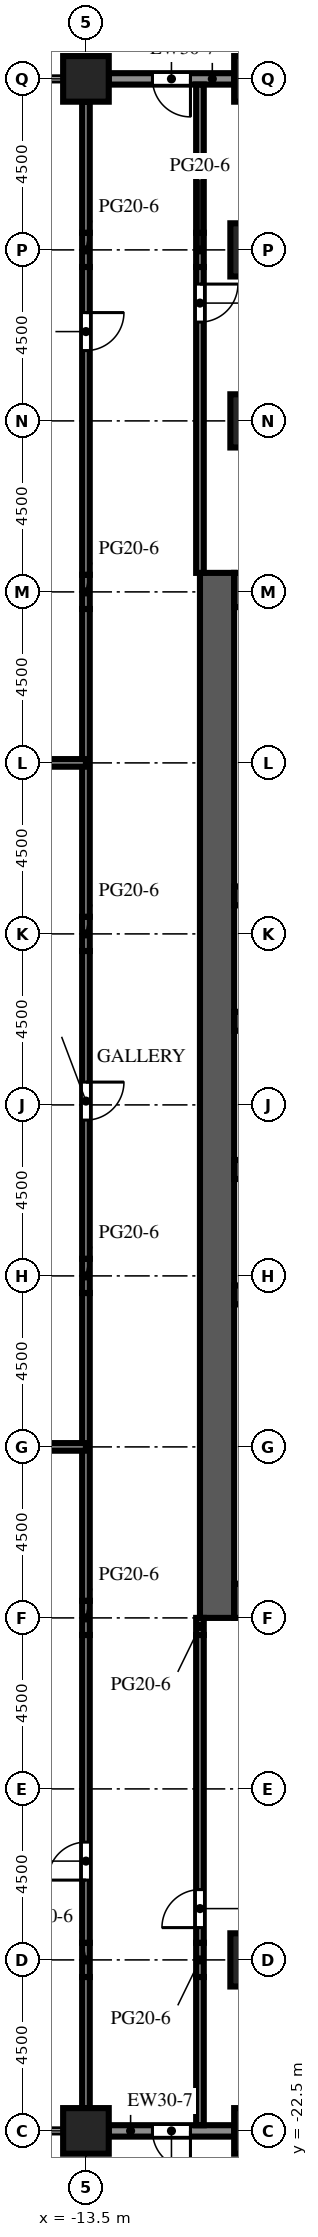
"""IFC4 building model, lengths in metres.
Left out: names, types, materials, properties, quantities, classifications, styles, units other than length and angle.
Written with IfcOpenShell. Run it as: python <this file> out.ifc"""

import sys

from ifc_helpers import new_model, si_unit, direction, frame, frame_2d, origin, origin_2d, place, context, subcontext, project, spatial, rectangle, extrude, element, fill, save


model = new_model("IFC4")
c1 = context("Model", 3, precision=1e-05, world=origin(), true_north=direction((0.0, 1.0)))
c2 = subcontext(c1, "Body", "Model", "MODEL_VIEW")
j1 = project(units=[si_unit("LENGTHUNIT", "METRE"), si_unit("PLANEANGLEUNIT", "RADIAN")], contexts=[c1])
p1 = place(None, origin())
s1 = spatial("IfcSite", under=j1, at=p1, CompositionType="ELEMENT")
p2 = place(p1, origin())
s2 = spatial("IfcBuilding", under=s1, at=p2, CompositionType="ELEMENT")
p3 = place(p2, frame((0.0, 0.0, 110.7)))
s3 = spatial("IfcBuildingStorey", under=s2, at=p3, CompositionType="ELEMENT", Elevation=110.7)
for number, where, z_axis, x_axis in (
    (1, (-13.5, -22.5, 0.0), (0.0, 0.0, 1.0), (1.0, 0.0, 0.0)),
    (2, (-13.5, 31.5, 0.0), (0.0, 0.0, 1.0), (1.0, 0.0, 0.0)),
    (3, (-9.0, -22.5, 0.0), (0.0, 0.0, 1.0), (1.0, 0.0, 0.0)),
    (4, (-9.0, 31.5, 0.0), (0.0, 0.0, 1.0), (1.0, 0.0, 0.0)),
):
    element("IfcColumn", number, at=place(p3, frame(where, z_axis=z_axis, x_axis=x_axis)), inside=s3, PredefinedType="COLUMN", context=c2, shape_type="SweptSolid", body=[
        extrude(rectangle(XDim=1.2, YDim=1.2, at=origin_2d()), origin(), (0.0, 0.0, 1.0), 6.0),
    ])
p4 = place(p3, frame((-9.0, -18.0, 0.0), z_axis=(0.0, 0.0, 1.0), x_axis=(1.0, 0.0, 0.0)))
e5 = element("IfcColumn", 5, at=p4, inside=s3, PredefinedType="COLUMN", context=c2, shape_type="SweptSolid", body=[
    extrude(rectangle(XDim=1.4, YDim=1.4, at=origin_2d()), origin(), (0.0, 0.0, 1.0), 5.55),
])
p5 = place(p3, frame((-9.0, 22.5, 0.0), z_axis=(0.0, 0.0, 1.0), x_axis=(1.0, 0.0, 0.0)))
e6 = element("IfcColumn", 6, at=p5, inside=s3, PredefinedType="COLUMN", context=c2, shape_type="SweptSolid", body=[
    extrude(rectangle(XDim=1.4, YDim=1.4, at=origin_2d()), origin(), (0.0, 0.0, 1.0), 6.0),
])
p6 = place(p3, frame((-9.0, 27.0, 0.0), z_axis=(0.0, 0.0, 1.0), x_axis=(1.0, 0.0, 0.0)))
e7 = element("IfcColumn", 7, at=p6, inside=s3, PredefinedType="COLUMN", context=c2, shape_type="SweptSolid", body=[
    extrude(rectangle(XDim=1.4, YDim=1.4, at=origin_2d()), origin(), (0.0, 0.0, 1.0), 5.55),
])
p7 = place(p3, frame((-10.05, -9.0, 0.0), z_axis=(0.0, 0.0, 1.0), x_axis=(0.0, 1.0, 0.0)))
e8 = element("IfcWall", 8, at=p7, inside=s3, PredefinedType="SHEAR", context=c2, shape_type="SweptSolid", body=[
    extrude(rectangle(XDim=27.5, YDim=0.9, at=frame_2d((13.75, 0.0))), origin(), (0.0, 0.0, 1.0), 6.0),
])
p8 = place(p7, frame((12.55, 0.0, 0.0)))
e9 = element("IfcOpeningElement", 9, at=p8, cuts=e8, PredefinedType="OPENING", context=c2, shape_type="SweptSolid", body=[
    extrude(rectangle(XDim=2.4, YDim=2.4, at=frame_2d((1.2, 1.2))), frame((0.0, 0.46, 0.0), z_axis=(0.0, -1.0, 0.0), x_axis=(1.0, 0.0, 0.0)), (0.0, 0.0, 1.0), 0.92),
])
p9 = place(p7, frame((6.825, 0.0, 0.0)))
e10 = element("IfcOpeningElement", 10, at=p9, cuts=e8, PredefinedType="OPENING", context=c2, shape_type="SweptSolid", body=[
    extrude(rectangle(XDim=1.2, YDim=2.1, at=frame_2d((0.6, 1.05))), frame((0.0, 0.46, 0.0), z_axis=(0.0, -1.0, 0.0), x_axis=(1.0, 0.0, 0.0)), (0.0, 0.0, 1.0), 0.92),
])
p10 = place(p7, frame((19.475, 0.0, 0.0)))
e11 = element("IfcOpeningElement", 11, at=p10, cuts=e8, PredefinedType="OPENING", context=c2, shape_type="SweptSolid", body=[
    extrude(rectangle(XDim=1.2, YDim=2.1, at=frame_2d((0.6, 1.05))), frame((0.0, 0.46, 0.0), z_axis=(0.0, -1.0, 0.0), x_axis=(1.0, 0.0, 0.0)), (0.0, 0.0, 1.0), 0.92),
])
for number, where, z_axis, x_axis in (
    (12, (-9.6, -8.55, 0.0), (0.0, 0.0, 1.0), (1.0, 0.0, 0.0)),
    (13, (-9.6, 18.05, 0.0), (0.0, 0.0, 1.0), (1.0, 0.0, 0.0)),
):
    element("IfcWall", number, at=place(p3, frame(where, z_axis=z_axis, x_axis=x_axis)), inside=s3, PredefinedType="SHEAR", context=c2, shape_type="SweptSolid", body=[
        extrude(rectangle(XDim=10.2, YDim=0.9, at=frame_2d((5.1, 0.0))), origin(), (0.0, 0.0, 1.0), 6.0),
    ])
p11 = place(p3, frame((-9.6, -0.5, 0.0), z_axis=(0.0, 0.0, 1.0), x_axis=(1.0, 0.0, 0.0)))
e14 = element("IfcWall", 14, at=p11, inside=s3, PredefinedType="SHEAR", context=c2, shape_type="SweptSolid", body=[
    extrude(rectangle(XDim=10.2, YDim=0.5, at=frame_2d((5.1, 0.0))), origin(), (0.0, 0.0, 1.0), 6.0),
])
p12 = place(p3, frame((-9.6, 2.8, 0.0), z_axis=(0.0, 0.0, 1.0), x_axis=(1.0, 0.0, 0.0)))
e15 = element("IfcWall", 15, at=p12, inside=s3, PredefinedType="SHEAR", context=c2, shape_type="SweptSolid", body=[
    extrude(rectangle(XDim=10.2, YDim=0.5, at=frame_2d((5.1, 0.0))), origin(), (0.0, 0.0, 1.0), 6.0),
])
p13 = place(p12, frame((0.562, 0.0, 0.0)))
e16 = element("IfcOpeningElement", 16, at=p13, cuts=e15, PredefinedType="OPENING", context=c2, shape_type="SweptSolid", body=[
    extrude(rectangle(XDim=1.1, YDim=2.1, at=frame_2d((0.55, 1.05))), frame((0.0, 0.26, 0.0), z_axis=(0.0, -1.0, 0.0), x_axis=(1.0, 0.0, 0.0)), (0.0, 0.0, 1.0), 0.52),
])
p14 = place(p12, frame((3.238, 0.0, 0.0)))
e17 = element("IfcOpeningElement", 17, at=p14, cuts=e15, PredefinedType="OPENING", context=c2, shape_type="SweptSolid", body=[
    extrude(rectangle(XDim=1.1, YDim=2.1, at=frame_2d((0.55, 1.05))), frame((0.0, 0.26, 0.0), z_axis=(0.0, -1.0, 0.0), x_axis=(1.0, 0.0, 0.0)), (0.0, 0.0, 1.0), 0.52),
])
p15 = place(p12, frame((8.538, 0.0, 0.0)))
e18 = element("IfcOpeningElement", 18, at=p15, cuts=e15, PredefinedType="OPENING", context=c2, shape_type="SweptSolid", body=[
    extrude(rectangle(XDim=1.1, YDim=2.1, at=frame_2d((0.55, 1.05))), frame((0.0, 0.26, 0.0), z_axis=(0.0, -1.0, 0.0), x_axis=(1.0, 0.0, 0.0)), (0.0, 0.0, 1.0), 0.52),
])
p16 = place(p3, frame((-9.6, 6.7, 0.0), z_axis=(0.0, 0.0, 1.0), x_axis=(1.0, 0.0, 0.0)))
e19 = element("IfcWall", 19, at=p16, inside=s3, PredefinedType="SHEAR", context=c2, shape_type="SweptSolid", body=[
    extrude(rectangle(XDim=10.2, YDim=0.5, at=frame_2d((5.1, 0.0))), origin(), (0.0, 0.0, 1.0), 6.0),
])
p17 = place(p16, frame((0.562, 0.0, 0.0)))
e20 = element("IfcOpeningElement", 20, at=p17, cuts=e19, PredefinedType="OPENING", context=c2, shape_type="SweptSolid", body=[
    extrude(rectangle(XDim=1.1, YDim=2.1, at=frame_2d((0.55, 1.05))), frame((0.0, 0.26, 0.0), z_axis=(0.0, -1.0, 0.0), x_axis=(1.0, 0.0, 0.0)), (0.0, 0.0, 1.0), 0.52),
])
p18 = place(p16, frame((3.288, 0.0, 0.0)))
e21 = element("IfcOpeningElement", 21, at=p18, cuts=e19, PredefinedType="OPENING", context=c2, shape_type="SweptSolid", body=[
    extrude(rectangle(XDim=1.0, YDim=2.1, at=frame_2d((0.5, 1.05))), frame((0.0, 0.26, 0.0), z_axis=(0.0, -1.0, 0.0), x_axis=(1.0, 0.0, 0.0)), (0.0, 0.0, 1.0), 0.52),
])
p19 = place(p16, frame((5.913, 0.0, 0.0)))
e22 = element("IfcOpeningElement", 22, at=p19, cuts=e19, PredefinedType="OPENING", context=c2, shape_type="SweptSolid", body=[
    extrude(rectangle(XDim=1.0, YDim=2.1, at=frame_2d((0.5, 1.05))), frame((0.0, 0.26, 0.0), z_axis=(0.0, -1.0, 0.0), x_axis=(1.0, 0.0, 0.0)), (0.0, 0.0, 1.0), 0.52),
])
p20 = place(p16, frame((8.587, 0.0, 0.0)))
e23 = element("IfcOpeningElement", 23, at=p20, cuts=e19, PredefinedType="OPENING", context=c2, shape_type="SweptSolid", body=[
    extrude(rectangle(XDim=1.0, YDim=2.1, at=frame_2d((0.5, 1.05))), frame((0.0, 0.26, 0.0), z_axis=(0.0, -1.0, 0.0), x_axis=(1.0, 0.0, 0.0)), (0.0, 0.0, 1.0), 0.52),
])
p21 = place(p3, frame((-9.6, 10.0, 0.0), z_axis=(0.0, 0.0, 1.0), x_axis=(1.0, 0.0, 0.0)))
e24 = element("IfcWall", 24, at=p21, inside=s3, PredefinedType="SHEAR", context=c2, shape_type="SweptSolid", body=[
    extrude(rectangle(XDim=10.2, YDim=0.5, at=frame_2d((5.1, 0.0))), origin(), (0.0, 0.0, 1.0), 6.0),
])
p22 = place(p3, frame((-9.6, -22.5, 0.0), z_axis=(0.0, 0.0, 1.0), x_axis=(-1.0, 0.0, 0.0)))
e25 = element("IfcWall", 25, at=p22, inside=s3, PredefinedType="SOLIDWALL", context=c2, shape_type="SweptSolid", body=[
    extrude(rectangle(XDim=3.3, YDim=0.3, at=frame_2d((1.65, 0.0))), origin(), (0.0, 0.0, 1.0), 4.65),
])
p23 = place(p22, frame((1.15, 0.0, 0.0)))
e26 = element("IfcOpeningElement", 26, at=p23, cuts=e25, PredefinedType="OPENING", context=c2, shape_type="SweptSolid", body=[
    extrude(rectangle(XDim=1.0, YDim=2.2, at=frame_2d((0.5, 1.1))), frame((0.0, 0.16, 0.0), z_axis=(0.0, -1.0, 0.0), x_axis=(1.0, 0.0, 0.0)), (0.0, 0.0, 1.0), 0.32),
])
p24 = place(p3, frame((-12.9, 31.5, 0.0), z_axis=(0.0, 0.0, 1.0), x_axis=(1.0, 0.0, 0.0)))
e27 = element("IfcWall", 27, at=p24, inside=s3, PredefinedType="SOLIDWALL", context=c2, shape_type="SweptSolid", body=[
    extrude(rectangle(XDim=3.3, YDim=0.3, at=frame_2d((1.65, 0.0))), origin(), (0.0, 0.0, 1.0), 4.65),
])
p25 = place(p24, frame((1.15, 0.0, 0.0)))
e28 = element("IfcOpeningElement", 28, at=p25, cuts=e27, PredefinedType="OPENING", context=c2, shape_type="SweptSolid", body=[
    extrude(rectangle(XDim=1.0, YDim=2.2, at=frame_2d((0.5, 1.1))), frame((0.0, 0.16, 0.0), z_axis=(0.0, -1.0, 0.0), x_axis=(1.0, 0.0, 0.0)), (0.0, 0.0, 1.0), 0.32),
])
p26 = place(p3, frame((-13.5, -21.9, 0.0), z_axis=(0.0, 0.0, 1.0), x_axis=(0.0, 1.0, 0.0)))
e29 = element("IfcWall", 29, at=p26, inside=s3, PredefinedType="PARTITIONING", context=c2, shape_type="SweptSolid", body=[
    extrude(rectangle(XDim=3.45, YDim=0.2, at=frame_2d((1.725, 0.0))), origin(), (0.0, 0.0, 1.0), 5.55),
])
p27 = place(p3, frame((-13.5, -18.45, 0.0), z_axis=(0.0, 0.0, 1.0), x_axis=(0.0, 1.0, 0.0)))
e30 = element("IfcWall", 30, at=p27, inside=s3, PredefinedType="PARTITIONING", context=c2, shape_type="SweptSolid", body=[
    extrude(rectangle(XDim=0.9, YDim=0.2, at=frame_2d((0.45, 0.0))), origin(), (0.0, 0.0, 1.0), 3.72),
])
p28 = place(p3, frame((-13.5, -17.55, 0.0), z_axis=(0.0, 0.0, 1.0), x_axis=(0.0, 1.0, 0.0)))
e31 = element("IfcWall", 31, at=p28, inside=s3, PredefinedType="PARTITIONING", context=c2, shape_type="SweptSolid", body=[
    extrude(rectangle(XDim=8.1, YDim=0.2, at=frame_2d((4.05, 0.0))), origin(), (0.0, 0.0, 1.0), 5.55),
])
p29 = place(p28, frame((1.65, 0.0, 0.0)))
e32 = element("IfcOpeningElement", 32, at=p29, cuts=e31, PredefinedType="OPENING", context=c2, shape_type="SweptSolid", body=[
    extrude(rectangle(XDim=1.0, YDim=2.1, at=frame_2d((0.5, 1.05))), frame((0.0, 0.11, 0.0), z_axis=(0.0, -1.0, 0.0), x_axis=(1.0, 0.0, 0.0)), (0.0, 0.0, 1.0), 0.22),
])
p30 = place(p3, frame((-13.5, -9.45, 0.0), z_axis=(0.0, 0.0, 1.0), x_axis=(0.0, 1.0, 0.0)))
e33 = element("IfcWall", 33, at=p30, inside=s3, PredefinedType="PARTITIONING", context=c2, shape_type="SweptSolid", body=[
    extrude(rectangle(XDim=0.9, YDim=0.2, at=frame_2d((0.45, 0.0))), origin(), (0.0, 0.0, 1.0), 3.72),
])
p31 = place(p3, frame((-13.5, -8.55, 0.0), z_axis=(0.0, 0.0, 1.0), x_axis=(0.0, 1.0, 0.0)))
e34 = element("IfcWall", 34, at=p31, inside=s3, PredefinedType="PARTITIONING", context=c2, shape_type="SweptSolid", body=[
    extrude(rectangle(XDim=8.1, YDim=0.2, at=frame_2d((4.05, 0.0))), origin(), (0.0, 0.0, 1.0), 5.55),
])
p32 = place(p3, frame((-13.5, -0.45, 0.0), z_axis=(0.0, 0.0, 1.0), x_axis=(0.0, 1.0, 0.0)))
e35 = element("IfcWall", 35, at=p32, inside=s3, PredefinedType="PARTITIONING", context=c2, shape_type="SweptSolid", body=[
    extrude(rectangle(XDim=0.9, YDim=0.2, at=frame_2d((0.45, 0.0))), origin(), (0.0, 0.0, 1.0), 3.72),
])
p33 = place(p3, frame((-13.5, 0.45, 0.0), z_axis=(0.0, 0.0, 1.0), x_axis=(0.0, 1.0, 0.0)))
e36 = element("IfcWall", 36, at=p33, inside=s3, PredefinedType="PARTITIONING", context=c2, shape_type="SweptSolid", body=[
    extrude(rectangle(XDim=8.1, YDim=0.2, at=frame_2d((4.05, 0.0))), origin(), (0.0, 0.0, 1.0), 5.55),
])
p34 = place(p33, frame((3.65, 0.0, 0.0)))
e37 = element("IfcOpeningElement", 37, at=p34, cuts=e36, PredefinedType="OPENING", context=c2, shape_type="SweptSolid", body=[
    extrude(rectangle(XDim=1.0, YDim=2.1, at=frame_2d((0.5, 1.05))), frame((0.0, 0.11, 0.0), z_axis=(0.0, -1.0, 0.0), x_axis=(1.0, 0.0, 0.0)), (0.0, 0.0, 1.0), 0.22),
])
p35 = place(p3, frame((-13.5, 8.55, 0.0), z_axis=(0.0, 0.0, 1.0), x_axis=(0.0, 1.0, 0.0)))
e38 = element("IfcWall", 38, at=p35, inside=s3, PredefinedType="PARTITIONING", context=c2, shape_type="SweptSolid", body=[
    extrude(rectangle(XDim=0.9, YDim=0.2, at=frame_2d((0.45, 0.0))), origin(), (0.0, 0.0, 1.0), 3.72),
])
p36 = place(p3, frame((-13.5, 9.45, 0.0), z_axis=(0.0, 0.0, 1.0), x_axis=(0.0, 1.0, 0.0)))
e39 = element("IfcWall", 39, at=p36, inside=s3, PredefinedType="PARTITIONING", context=c2, shape_type="SweptSolid", body=[
    extrude(rectangle(XDim=8.1, YDim=0.2, at=frame_2d((4.05, 0.0))), origin(), (0.0, 0.0, 1.0), 5.55),
])
p37 = place(p3, frame((-13.5, 17.55, 0.0), z_axis=(0.0, 0.0, 1.0), x_axis=(0.0, 1.0, 0.0)))
e40 = element("IfcWall", 40, at=p37, inside=s3, PredefinedType="PARTITIONING", context=c2, shape_type="SweptSolid", body=[
    extrude(rectangle(XDim=0.9, YDim=0.2, at=frame_2d((0.45, 0.0))), origin(), (0.0, 0.0, 1.0), 3.72),
])
p38 = place(p3, frame((-13.5, 18.45, 0.0), z_axis=(0.0, 0.0, 1.0), x_axis=(0.0, 1.0, 0.0)))
e41 = element("IfcWall", 41, at=p38, inside=s3, PredefinedType="PARTITIONING", context=c2, shape_type="SweptSolid", body=[
    extrude(rectangle(XDim=8.1, YDim=0.2, at=frame_2d((4.05, 0.0))), origin(), (0.0, 0.0, 1.0), 5.55),
])
p39 = place(p38, frame((5.9, 0.0, 0.0)))
e42 = element("IfcOpeningElement", 42, at=p39, cuts=e41, PredefinedType="OPENING", context=c2, shape_type="SweptSolid", body=[
    extrude(rectangle(XDim=1.0, YDim=2.1, at=frame_2d((0.5, 1.05))), frame((0.0, 0.11, 0.0), z_axis=(0.0, -1.0, 0.0), x_axis=(1.0, 0.0, 0.0)), (0.0, 0.0, 1.0), 0.22),
])
p40 = place(p3, frame((-13.5, 26.55, 0.0), z_axis=(0.0, 0.0, 1.0), x_axis=(0.0, 1.0, 0.0)))
e43 = element("IfcWall", 43, at=p40, inside=s3, PredefinedType="PARTITIONING", context=c2, shape_type="SweptSolid", body=[
    extrude(rectangle(XDim=0.9, YDim=0.2, at=frame_2d((0.45, 0.0))), origin(), (0.0, 0.0, 1.0), 3.72),
])
p41 = place(p3, frame((-13.5, 27.45, 0.0), z_axis=(0.0, 0.0, 1.0), x_axis=(0.0, 1.0, 0.0)))
e44 = element("IfcWall", 44, at=p41, inside=s3, PredefinedType="PARTITIONING", context=c2, shape_type="SweptSolid", body=[
    extrude(rectangle(XDim=3.45, YDim=0.2, at=frame_2d((1.725, 0.0))), origin(), (0.0, 0.0, 1.0), 5.55),
])
p42 = place(p3, frame((-10.5, -22.35, 0.0), z_axis=(0.0, 0.0, 1.0), x_axis=(0.0, 1.0, 0.0)))
e45 = element("IfcWall", 45, at=p42, inside=s3, PredefinedType="PARTITIONING", context=c2, shape_type="SweptSolid", body=[
    extrude(rectangle(XDim=3.9, YDim=0.2, at=frame_2d((1.95, 0.0))), origin(), (0.0, 0.0, 1.0), 5.55),
])
p43 = place(p3, frame((-10.5, -18.45, 0.0), z_axis=(0.0, 0.0, 1.0), x_axis=(0.0, 1.0, 0.0)))
e46 = element("IfcWall", 46, at=p43, inside=s3, PredefinedType="PARTITIONING", context=c2, shape_type="SweptSolid", body=[
    extrude(rectangle(XDim=0.9, YDim=0.2, at=frame_2d((0.45, 0.0))), origin(), (0.0, 0.0, 1.0), 3.72),
])
p44 = place(p3, frame((-10.5, -9.45, 0.0), z_axis=(0.0, 0.0, 1.0), x_axis=(0.0, -1.0, 0.0)))
e47 = element("IfcWall", 47, at=p44, inside=s3, PredefinedType="PARTITIONING", context=c2, shape_type="SweptSolid", body=[
    extrude(rectangle(XDim=8.1, YDim=0.2, at=frame_2d((4.05, 0.0))), origin(), (0.0, 0.0, 1.0), 5.55),
])
p45 = place(p44, frame((6.7, 0.0, 0.0)))
e48 = element("IfcOpeningElement", 48, at=p45, cuts=e47, PredefinedType="OPENING", context=c2, shape_type="SweptSolid", body=[
    extrude(rectangle(XDim=1.0, YDim=2.1, at=frame_2d((0.5, 1.05))), frame((0.0, 0.11, 0.0), z_axis=(0.0, -1.0, 0.0), x_axis=(1.0, 0.0, 0.0)), (0.0, 0.0, 1.0), 0.22),
])
p46 = place(p3, frame((-10.5, -9.45, 0.0), z_axis=(0.0, 0.0, 1.0), x_axis=(0.0, 1.0, 0.0)))
e49 = element("IfcWall", 49, at=p46, inside=s3, PredefinedType="PARTITIONING", context=c2, shape_type="SweptSolid", body=[
    extrude(rectangle(XDim=0.45, YDim=0.2, at=frame_2d((0.225, 0.0))), origin(), (0.0, 0.0, 1.0), 3.72),
])
p47 = place(p3, frame((-10.5, 26.55, 0.0), z_axis=(0.0, 0.0, 1.0), x_axis=(0.0, -1.0, 0.0)))
e50 = element("IfcWall", 50, at=p47, inside=s3, PredefinedType="PARTITIONING", context=c2, shape_type="SweptSolid", body=[
    extrude(rectangle(XDim=8.05, YDim=0.2, at=frame_2d((4.025, 0.0))), origin(), (0.0, 0.0, 1.0), 5.55),
])
p48 = place(p47, frame((0.45, 0.0, 0.0)))
e51 = element("IfcOpeningElement", 51, at=p48, cuts=e50, PredefinedType="OPENING", context=c2, shape_type="SweptSolid", body=[
    extrude(rectangle(XDim=1.0, YDim=2.1, at=frame_2d((0.5, 1.05))), frame((0.0, 0.11, 0.0), z_axis=(0.0, -1.0, 0.0), x_axis=(1.0, 0.0, 0.0)), (0.0, 0.0, 1.0), 0.22),
])
p49 = place(p3, frame((-10.5, 26.55, 0.0), z_axis=(0.0, 0.0, 1.0), x_axis=(0.0, 1.0, 0.0)))
e52 = element("IfcWall", 52, at=p49, inside=s3, PredefinedType="PARTITIONING", context=c2, shape_type="SweptSolid", body=[
    extrude(rectangle(XDim=0.9, YDim=0.2, at=frame_2d((0.45, 0.0))), origin(), (0.0, 0.0, 1.0), 3.72),
])
p50 = place(p3, frame((-10.5, 27.45, 0.0), z_axis=(0.0, 0.0, 1.0), x_axis=(0.0, 1.0, 0.0)))
e53 = element("IfcWall", 53, at=p50, inside=s3, PredefinedType="PARTITIONING", context=c2, shape_type="SweptSolid", body=[
    extrude(rectangle(XDim=3.9, YDim=0.2, at=frame_2d((1.95, 0.0))), origin(), (0.0, 0.0, 1.0), 5.55),
])
for number, where, z_axis, x_axis in (
    (54, (-21.9, -4.5, 0.0), (0.0, 0.0, 1.0), (1.0, 0.0, 0.0)),
    (55, (-21.9, 13.5, 0.0), (0.0, 0.0, 1.0), (1.0, 0.0, 0.0)),
):
    element("IfcWall", number, at=place(p3, frame(where, z_axis=z_axis, x_axis=x_axis)), inside=s3, PredefinedType="PARTITIONING", context=c2, shape_type="SweptSolid", body=[
        extrude(rectangle(XDim=8.4, YDim=0.2, at=frame_2d((4.2, 0.0))), origin(), (0.0, 0.0, 1.0), 5.55),
    ])
p51 = place(p23, origin())
e56 = element("IfcDoor", 56, at=p51, inside=s3, OperationType="SINGLE_SWING_LEFT", PredefinedType="DOOR", context=c2, shape_type="SweptSolid", body=[
    extrude(rectangle(XDim=1.0, YDim=2.2, at=frame_2d((0.5, 1.1))), frame((0.0, 0.025, 0.0), z_axis=(0.0, -1.0, 0.0), x_axis=(1.0, 0.0, 0.0)), (0.0, 0.0, 1.0), 0.05),
])
fill(e26, e56)
p52 = place(p25, origin())
e57 = element("IfcDoor", 57, at=p52, inside=s3, OperationType="SINGLE_SWING_RIGHT", PredefinedType="DOOR", context=c2, shape_type="SweptSolid", body=[
    extrude(rectangle(XDim=1.0, YDim=2.2, at=frame_2d((0.5, 1.1))), frame((0.0, 0.025, 0.0), z_axis=(0.0, -1.0, 0.0), x_axis=(1.0, 0.0, 0.0)), (0.0, 0.0, 1.0), 0.05),
])
fill(e28, e57)
p53 = place(p8, origin())
e58 = element("IfcDoor", 58, at=p53, inside=s3, OperationType="DOUBLE_DOOR_DOUBLE_SWING", PredefinedType="DOOR", context=c2, shape_type="SweptSolid", body=[
    extrude(rectangle(XDim=2.4, YDim=2.4, at=frame_2d((1.2, 1.2))), frame((0.0, 0.025, 0.0), z_axis=(0.0, -1.0, 0.0), x_axis=(1.0, 0.0, 0.0)), (0.0, 0.0, 1.0), 0.05),
])
fill(e9, e58)
p54 = place(p9, origin())
e59 = element("IfcDoor", 59, at=p54, inside=s3, OperationType="SINGLE_SWING_LEFT", PredefinedType="DOOR", context=c2, shape_type="SweptSolid", body=[
    extrude(rectangle(XDim=1.2, YDim=2.1, at=frame_2d((0.6, 1.05))), frame((0.0, 0.025, 0.0), z_axis=(0.0, -1.0, 0.0), x_axis=(1.0, 0.0, 0.0)), (0.0, 0.0, 1.0), 0.05),
])
fill(e10, e59)
p55 = place(p10, origin())
e60 = element("IfcDoor", 60, at=p55, inside=s3, OperationType="SINGLE_SWING_LEFT", PredefinedType="DOOR", context=c2, shape_type="SweptSolid", body=[
    extrude(rectangle(XDim=1.2, YDim=2.1, at=frame_2d((0.6, 1.05))), frame((0.0, 0.025, 0.0), z_axis=(0.0, -1.0, 0.0), x_axis=(1.0, 0.0, 0.0)), (0.0, 0.0, 1.0), 0.05),
])
fill(e11, e60)
p56 = place(p29, origin())
e61 = element("IfcDoor", 61, at=p56, inside=s3, OperationType="SINGLE_SWING_LEFT", PredefinedType="DOOR", context=c2, shape_type="SweptSolid", body=[
    extrude(rectangle(XDim=1.0, YDim=2.1, at=frame_2d((0.5, 1.05))), frame((0.0, 0.025, 0.0), z_axis=(0.0, -1.0, 0.0), x_axis=(1.0, 0.0, 0.0)), (0.0, 0.0, 1.0), 0.05),
])
fill(e32, e61)
p57 = place(p34, origin())
e62 = element("IfcDoor", 62, at=p57, inside=s3, OperationType="SINGLE_SWING_RIGHT", PredefinedType="DOOR", context=c2, shape_type="SweptSolid", body=[
    extrude(rectangle(XDim=1.0, YDim=2.1, at=frame_2d((0.5, 1.05))), frame((0.0, 0.025, 0.0), z_axis=(0.0, -1.0, 0.0), x_axis=(1.0, 0.0, 0.0)), (0.0, 0.0, 1.0), 0.05),
])
fill(e37, e62)
p58 = place(p39, origin())
e63 = element("IfcDoor", 63, at=p58, inside=s3, OperationType="SINGLE_SWING_RIGHT", PredefinedType="DOOR", context=c2, shape_type="SweptSolid", body=[
    extrude(rectangle(XDim=1.0, YDim=2.1, at=frame_2d((0.5, 1.05))), frame((0.0, 0.025, 0.0), z_axis=(0.0, -1.0, 0.0), x_axis=(1.0, 0.0, 0.0)), (0.0, 0.0, 1.0), 0.05),
])
fill(e42, e63)
p59 = place(p45, origin())
e64 = element("IfcDoor", 64, at=p59, inside=s3, OperationType="SINGLE_SWING_RIGHT", PredefinedType="DOOR", context=c2, shape_type="SweptSolid", body=[
    extrude(rectangle(XDim=1.0, YDim=2.1, at=frame_2d((0.5, 1.05))), frame((0.0, 0.025, 0.0), z_axis=(0.0, -1.0, 0.0), x_axis=(1.0, 0.0, 0.0)), (0.0, 0.0, 1.0), 0.05),
])
fill(e48, e64)
p60 = place(p48, origin())
e65 = element("IfcDoor", 65, at=p60, inside=s3, OperationType="SINGLE_SWING_LEFT", PredefinedType="DOOR", context=c2, shape_type="SweptSolid", body=[
    extrude(rectangle(XDim=1.0, YDim=2.1, at=frame_2d((0.5, 1.05))), frame((0.0, 0.025, 0.0), z_axis=(0.0, -1.0, 0.0), x_axis=(1.0, 0.0, 0.0)), (0.0, 0.0, 1.0), 0.05),
])
fill(e51, e65)
save(model, sys.argv[1])
